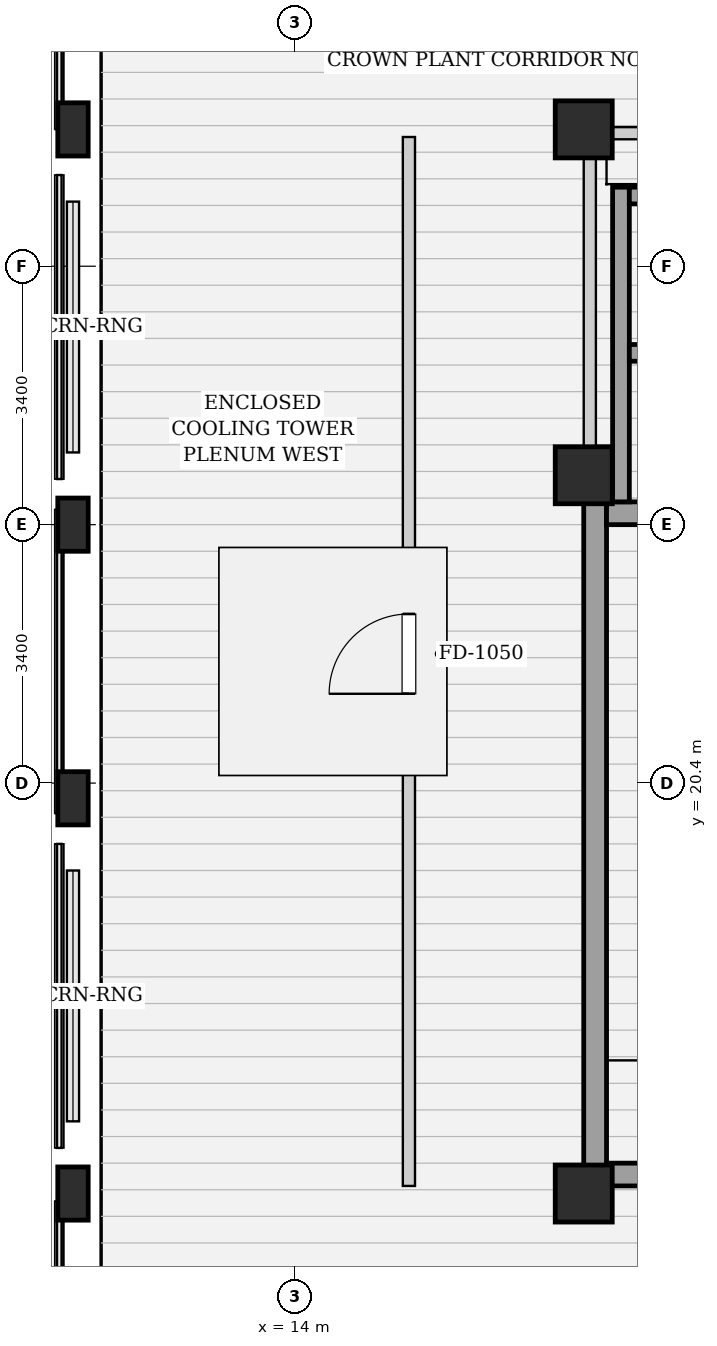
"""IFC4 building model, lengths in metres.
Left out: names, types, materials, properties, quantities, classifications, styles, units other than length and angle.
Written with IfcOpenShell. Run it as: python <this file> out.ifc"""

import sys

from ifc_helpers import new_model, si_unit, direction, frame, frame_2d, origin, origin_2d, place, context, subcontext, project, spatial, rectangle, hollow_rectangle, extrude, element, fill, save


model = new_model("IFC4")
c1 = context("Model", 3, precision=1e-05, world=origin(), true_north=direction((0.0, 1.0)))
c2 = subcontext(c1, "Body", "Model", "MODEL_VIEW")
j1 = project(units=[si_unit("LENGTHUNIT", "METRE"), si_unit("PLANEANGLEUNIT", "RADIAN")], contexts=[c1])
p1 = place(None, origin())
s1 = spatial("IfcSite", under=j1, at=p1, CompositionType="ELEMENT")
p2 = place(p1, origin())
s2 = spatial("IfcBuilding", under=s1, at=p2, CompositionType="ELEMENT")
p3 = place(p2, frame((0.0, 0.0, 261.5)))
s3 = spatial("IfcBuildingStorey", under=s2, at=p3, CompositionType="ELEMENT", Elevation=261.5)
for number, where, z_axis, x_axis in (
    (1, (11.08, 15.0, 0.035), (0.0, 0.0, 1.0), (1.0, 0.0, 0.0)),
    (2, (11.08, 20.2, 0.035), (0.0, 0.0, 1.0), (1.0, 0.0, 0.0)),
    (3, (11.08, 23.8, 0.035), (0.0, 0.0, 1.0), (1.0, 0.0, 0.0)),
    (4, (11.08, 29.0, 0.035), (0.0, 0.0, 1.0), (1.0, 0.0, 0.0)),
):
    element("IfcColumn", number, at=place(p3, frame(where, z_axis=z_axis, x_axis=x_axis)), inside=s3, PredefinedType="USERDEFINED", context=c2, shape_type="SweptSolid", body=[
        extrude(hollow_rectangle(XDim=0.4, YDim=0.7, WallThickness=0.02, InnerFilletRadius=0.02, OuterFilletRadius=0.04, at=origin_2d()), origin(), (0.0, 0.0, 1.0), 13.115),
    ])
for number, where, z_axis, x_axis in (
    (5, (17.8, 15.0, 0.0), (0.0, 0.0, 1.0), (1.0, 0.0, 0.0)),
    (6, (17.8, 29.0, 0.0), (0.0, 0.0, 1.0), (1.0, 0.0, 0.0)),
    (7, (17.8, 24.45, 0.0), (0.0, 0.0, 1.0), (1.0, 0.0, 0.0)),
):
    element("IfcColumn", number, at=place(p3, frame(where, z_axis=z_axis, x_axis=x_axis)), inside=s3, PredefinedType="COLUMN", context=c2, shape_type="SweptSolid", body=[
        extrude(rectangle(XDim=0.75, YDim=0.75, at=origin_2d()), origin(), (0.0, 0.0, 1.0), 12.95),
    ])
p4 = place(p3, frame((17.95, 15.1, 0.0), z_axis=(0.0, 0.0, 1.0), x_axis=(0.0, 1.0, 0.0)))
e8 = element("IfcWall", 8, at=p4, inside=s3, PredefinedType="SHEAR", context=c2, shape_type="SweptSolid", body=[
    extrude(rectangle(XDim=9.0, YDim=0.3, at=frame_2d((4.5, 0.0))), origin(), (0.0, 0.0, 1.0), 13.2),
])
p5 = place(p3, frame((18.1, 23.95, 0.0), z_axis=(0.0, 0.0, 1.0), x_axis=(1.0, 0.0, 0.0)))
e9 = element("IfcWall", 9, at=p5, inside=s3, PredefinedType="SHEAR", context=c2, shape_type="SweptSolid", body=[
    extrude(rectangle(XDim=2.85, YDim=0.3, at=frame_2d((1.425, 0.0))), origin(), (0.0, 0.0, 1.0), 13.2),
])
p6 = place(p3, frame((18.1, 15.25, 0.0), z_axis=(0.0, 0.0, 1.0), x_axis=(1.0, 0.0, 0.0)))
e10 = element("IfcWall", 10, at=p6, inside=s3, PredefinedType="SHEAR", context=c2, shape_type="SweptSolid", body=[
    extrude(rectangle(XDim=2.85, YDim=0.3, at=frame_2d((1.425, 0.0))), origin(), (0.0, 0.0, 1.0), 13.2),
])
p7 = place(p6, frame((0.86, 0.0, 0.0)))
e11 = element("IfcOpeningElement", 11, at=p7, cuts=e10, PredefinedType="OPENING", context=c2, shape_type="SweptSolid", body=[
    extrude(rectangle(XDim=1.1, YDim=2.05, at=frame_2d((0.55, 1.025))), frame((0.0, 0.16, 0.0), z_axis=(0.0, -1.0, 0.0), x_axis=(1.0, 0.0, 0.0)), (0.0, 0.0, 1.0), 0.32),
])
p8 = place(p3, frame((18.29, 24.1, 0.0), z_axis=(0.0, 0.0, 1.0), x_axis=(0.0, 1.0, 0.0)))
e12 = element("IfcWall", 12, at=p8, inside=s3, PredefinedType="SHEAR", context=c2, shape_type="SweptSolid", body=[
    extrude(rectangle(XDim=4.14, YDim=0.22, at=frame_2d((2.07, 0.0))), origin(), (0.0, 0.0, 1.0), 13.2),
])
for number, where, z_axis, x_axis in (
    (13, (18.4, 26.06, 0.0), (0.0, 0.0, 1.0), (1.0, 0.0, 0.0)),
    (14, (18.4, 28.13, 0.0), (0.0, 0.0, 1.0), (1.0, 0.0, 0.0)),
):
    element("IfcWall", number, at=place(p3, frame(where, z_axis=z_axis, x_axis=x_axis)), inside=s3, PredefinedType="SHEAR", context=c2, shape_type="SweptSolid", body=[
        extrude(rectangle(XDim=1.9, YDim=0.22, at=frame_2d((0.95, 0.0))), origin(), (0.0, 0.0, 1.0), 13.2),
    ])
p9 = place(p3, frame((17.88, 24.12, 0.0), z_axis=(0.0, 0.0, 1.0), x_axis=(0.0, 1.0, 0.0)))
e15 = element("IfcWall", 15, at=p9, inside=s3, PredefinedType="PARTITIONING", context=c2, shape_type="SweptSolid", body=[
    extrude(rectangle(XDim=4.76, YDim=0.16, at=frame_2d((2.38, 0.0))), origin(), (0.0, 0.0, 1.0), 12.319),
])
p10 = place(p3, frame((17.96, 28.95, 0.0), z_axis=(0.0, 0.0, 1.0), x_axis=(1.0, 0.0, 0.0)))
e16 = element("IfcWall", 16, at=p10, inside=s3, PredefinedType="PARTITIONING", context=c2, shape_type="SweptSolid", body=[
    extrude(rectangle(XDim=4.29, YDim=0.16, at=frame_2d((2.145, 0.0))), origin(), (0.0, 0.0, 1.0), 12.319),
])
p11 = place(p10, frame((1.715, 0.0, 0.0)))
e17 = element("IfcOpeningElement", 17, at=p11, cuts=e16, PredefinedType="OPENING", context=c2, shape_type="SweptSolid", body=[
    extrude(rectangle(XDim=0.86, YDim=2.05, at=frame_2d((0.43, 1.025))), frame((0.0, 0.09, 0.0), z_axis=(0.0, -1.0, 0.0), x_axis=(1.0, 0.0, 0.0)), (0.0, 0.0, 1.0), 0.18),
])
p12 = place(p3, frame((15.5, 15.1, 0.0), z_axis=(0.0, 0.0, 1.0), x_axis=(0.0, 1.0, 0.0)))
e18 = element("IfcWall", 18, at=p12, inside=s3, PredefinedType="PARTITIONING", context=c2, shape_type="SweptSolid", body=[
    extrude(rectangle(XDim=13.8, YDim=0.16, at=frame_2d((6.9, 0.0))), origin(), (0.0, 0.0, 1.0), 13.2),
])
p13 = place(p12, frame((6.475, 0.0, 0.0)))
e19 = element("IfcOpeningElement", 19, at=p13, cuts=e18, PredefinedType="OPENING", context=c2, shape_type="SweptSolid", body=[
    extrude(rectangle(XDim=1.05, YDim=2.05, at=frame_2d((0.525, 1.025))), frame((0.0, 0.09, 0.0), z_axis=(0.0, -1.0, 0.0), x_axis=(1.0, 0.0, 0.0)), (0.0, 0.0, 1.0), 0.18),
])
p14 = place(p13, origin())
e20 = element("IfcDoor", 20, at=p14, inside=s3, OperationType="SINGLE_SWING_LEFT", PredefinedType="DOOR", context=c2, shape_type="SweptSolid", body=[
    extrude(rectangle(XDim=1.05, YDim=2.05, at=frame_2d((0.525, 1.025))), frame((0.0, 0.025, 0.0), z_axis=(0.0, -1.0, 0.0), x_axis=(1.0, 0.0, 0.0)), (0.0, 0.0, 1.0), 0.05),
])
fill(e19, e20)
save(model, sys.argv[1])
